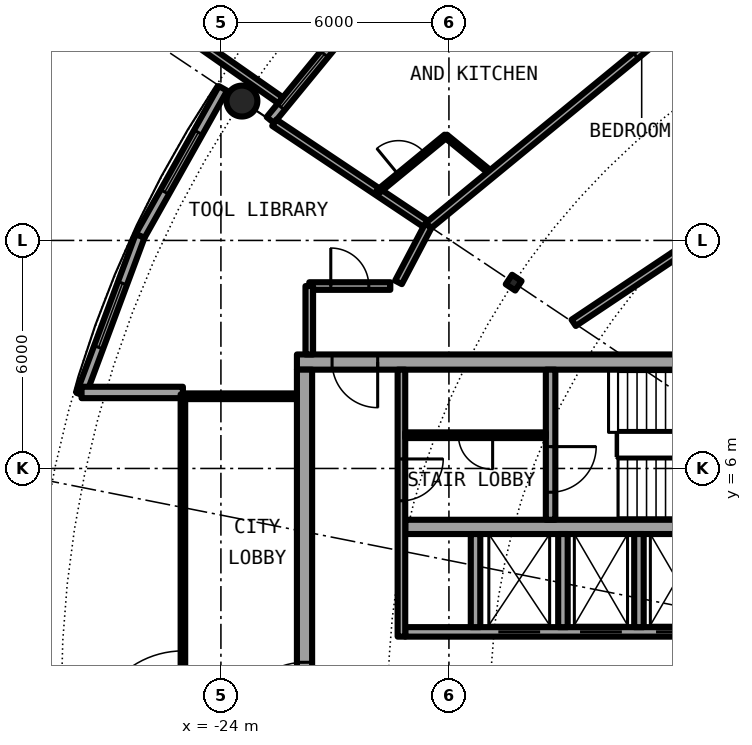
"""IFC4 building model, lengths in metres.
Left out: names, types, materials, properties, quantities, classifications, styles, units other than length and angle.
Written with IfcOpenShell. Run it as: python <this file> out.ifc"""

import sys

from ifc_helpers import new_model, si_unit, direction, frame, frame_2d, origin, origin_2d, place, context, subcontext, project, spatial, rectangle, hollow_circle, i_section, extrude, element, fill, save


model = new_model("IFC4")
c1 = context("Model", 3, precision=1e-05, world=origin(), true_north=direction((0.0, 1.0)))
c2 = subcontext(c1, "Body", "Model", "MODEL_VIEW")
j1 = project(units=[si_unit("LENGTHUNIT", "METRE"), si_unit("PLANEANGLEUNIT", "RADIAN")], contexts=[c1])
p1 = place(None, origin())
s1 = spatial("IfcSite", under=j1, at=p1, CompositionType="ELEMENT")
p2 = place(p1, origin())
s2 = spatial("IfcBuilding", under=s1, at=p2, CompositionType="ELEMENT")
p3 = place(p2, frame((0.0, 0.0, 227.95)))
s3 = spatial("IfcBuildingStorey", under=s2, at=p3, CompositionType="ELEMENT", Elevation=227.95)
p4 = place(p3, frame((-23.448, 15.667, 0.0), z_axis=(0.0, 0.0, 1.0), x_axis=(1.0, 0.0, 0.0)))
e1 = element("IfcColumn", 1, at=p4, inside=s3, PredefinedType="COLUMN", context=c2, shape_type="SweptSolid", body=[
    extrude(hollow_circle(Radius=0.406, WallThickness=0.03, at=origin_2d()), origin(), (0.0, 0.0, 1.0), 3.05),
])
p5 = place(p3, frame((-16.297, 10.889, 0.0), z_axis=(0.0, 0.0, 1.0), x_axis=(-0.831469612303, 0.55557023302, 0.0)))
e2 = element("IfcColumn", 2, at=p5, inside=s3, PredefinedType="COLUMN", context=c2, shape_type="SweptSolid", body=[
    extrude(i_section(OverallWidth=0.3, OverallDepth=0.3, WebThickness=0.011, FlangeThickness=0.019, FilletRadius=0.027, at=origin_2d()), origin(), (0.0, 0.0, 1.0), 3.05),
])
p6 = place(p3, frame((-19.304, 19.304, 0.0), z_axis=(0.0, 0.0, 1.0), x_axis=(-0.634382322723, -0.773019449054, 0.0)))
e3 = element("IfcWall", 3, at=p6, inside=s3, PredefinedType="SOLIDWALL", context=c2, shape_type="SweptSolid", body=[
    extrude(rectangle(XDim=5.352, YDim=0.25, at=frame_2d((2.676, 0.0))), origin(), (0.0, 0.0, 1.0), 2.7),
])
p7 = place(p6, frame((0.841, 0.0, 0.0)))
e4 = element("IfcOpeningElement", 4, at=p7, cuts=e3, PredefinedType="OPENING", context=c2, shape_type="SweptSolid", body=[
    extrude(rectangle(XDim=1.0, YDim=2.2, at=frame_2d((0.5, 1.1))), frame((0.0, 0.135, 0.0), z_axis=(0.0, -1.0, 0.0), x_axis=(1.0, 0.0, 0.0)), (0.0, 0.0, 1.0), 0.27),
])
p8 = place(p6, frame((3.111, 0.0, 0.3)))
e5 = element("IfcOpeningElement", 5, at=p8, cuts=e3, PredefinedType="OPENING", context=c2, shape_type="SweptSolid", body=[
    extrude(rectangle(XDim=1.8, YDim=2.1, at=frame_2d((0.9, 1.05))), frame((0.0, 0.135, 0.0), z_axis=(0.0, -1.0, 0.0), x_axis=(1.0, 0.0, 0.0)), (0.0, 0.0, 1.0), 0.27),
])
p9 = place(p3, frame((-22.433, 15.688, -0.03), z_axis=(0.0, 0.0, 1.0), x_axis=(-0.819373043115, 0.573260687834, 0.0)))
e6 = element("IfcWall", 6, at=p9, inside=s3, PredefinedType="SOLIDWALL", context=c2, shape_type="SweptSolid", body=[
    extrude(rectangle(XDim=2.925, YDim=0.2, at=frame_2d((1.463, 0.0))), origin(), (0.0, 0.0, 1.0), 2.73),
])
p10 = place(p3, frame((-23.946, 16.0, 0.0), z_axis=(0.0, 0.0, 1.0), x_axis=(-0.489696356642, -0.871893042919, 0.0)))
e7 = element("IfcWall", 7, at=p10, inside=s3, PredefinedType="SOLIDWALL", context=c2, shape_type="SweptSolid", body=[
    extrude(rectangle(XDim=4.454, YDim=0.25, at=frame_2d((2.227, 0.0))), origin(), (0.0, 0.0, 1.0), 2.7),
])
p11 = place(p10, frame((1.327, 0.0, 0.3)))
e8 = element("IfcOpeningElement", 8, at=p11, cuts=e7, PredefinedType="OPENING", context=c2, shape_type="SweptSolid", body=[
    extrude(rectangle(XDim=1.8, YDim=2.1, at=frame_2d((0.9, 1.05))), frame((0.0, 0.135, 0.0), z_axis=(0.0, -1.0, 0.0), x_axis=(1.0, 0.0, 0.0)), (0.0, 0.0, 1.0), 0.27),
])
p12 = place(p3, frame((-26.127, 12.117, 0.0), z_axis=(0.0, 0.0, 1.0), x_axis=(-0.349247811493, -0.937030397675, 0.0)))
e9 = element("IfcWall", 9, at=p12, inside=s3, PredefinedType="SOLIDWALL", context=c2, shape_type="SweptSolid", body=[
    extrude(rectangle(XDim=4.452, YDim=0.25, at=frame_2d((2.226, 0.0))), origin(), (0.0, 0.0, 1.0), 2.7),
])
p13 = place(p12, frame((1.327, 0.0, 0.3)))
e10 = element("IfcOpeningElement", 10, at=p13, cuts=e9, PredefinedType="OPENING", context=c2, shape_type="SweptSolid", body=[
    extrude(rectangle(XDim=1.8, YDim=2.1, at=frame_2d((0.9, 1.05))), frame((0.0, 0.135, 0.0), z_axis=(0.0, -1.0, 0.0), x_axis=(1.0, 0.0, 0.0)), (0.0, 0.0, 1.0), 0.27),
])
p14 = place(p3, frame((-25.0, 8.0, 0.0), z_axis=(0.0, 0.0, 1.0), x_axis=(-1.0, 0.0, 0.0)))
e11 = element("IfcWall", 11, at=p14, inside=s3, PredefinedType="SOLIDWALL", context=c2, shape_type="SweptSolid", body=[
    extrude(rectangle(XDim=2.667, YDim=0.3, at=frame_2d((1.333, 0.0))), origin(), (0.0, 0.0, 1.0), 2.7),
])
p15 = place(p3, frame((-8.6, 8.8, 0.0), z_axis=(0.0, 0.0, 1.0), x_axis=(-1.0, 0.0, 0.0)))
e12 = element("IfcWall", 12, at=p15, inside=s3, PredefinedType="SHEAR", context=c2, shape_type="SweptSolid", body=[
    extrude(rectangle(XDim=13.4, YDim=0.4, at=frame_2d((6.7, 0.0))), origin(), (0.0, 0.0, 1.0), 3.05),
])
p16 = place(p15, frame((11.275, 0.0, 0.0)))
e13 = element("IfcOpeningElement", 13, at=p16, cuts=e12, PredefinedType="OPENING", context=c2, shape_type="SweptSolid", body=[
    extrude(rectangle(XDim=1.2, YDim=2.3, at=frame_2d((0.6, 1.15))), frame((0.0, 0.21, 0.0), z_axis=(0.0, -1.0, 0.0), x_axis=(1.0, 0.0, 0.0)), (0.0, 0.0, 1.0), 0.42),
])
p17 = place(p3, frame((-21.8, -8.6, 0.0), z_axis=(0.0, 0.0, 1.0), x_axis=(0.0, 1.0, 0.0)))
e14 = element("IfcWall", 14, at=p17, inside=s3, PredefinedType="SHEAR", context=c2, shape_type="SweptSolid", body=[
    extrude(rectangle(XDim=17.2, YDim=0.4, at=frame_2d((8.6, 0.0))), origin(), (0.0, 0.0, 1.0), 3.05),
])
p18 = place(p17, frame((7.7, 0.0, 0.0)))
e15 = element("IfcOpeningElement", 15, at=p18, cuts=e14, PredefinedType="OPENING", context=c2, shape_type="SweptSolid", body=[
    extrude(rectangle(XDim=1.8, YDim=2.3, at=frame_2d((0.9, 1.15))), frame((0.0, 0.21, 0.0), z_axis=(0.0, -1.0, 0.0), x_axis=(1.0, 0.0, 0.0)), (0.0, 0.0, 1.0), 0.42),
])
p19 = place(p3, frame((-9.0, 1.7, 0.0), z_axis=(0.0, 0.0, 1.0), x_axis=(-1.0, 0.0, 0.0)))
e16 = element("IfcWall", 16, at=p19, inside=s3, PredefinedType="SHEAR", context=c2, shape_type="SweptSolid", body=[
    extrude(rectangle(XDim=10.15, YDim=0.25, at=frame_2d((5.075, 0.0))), origin(), (0.0, 0.0, 1.0), 3.05),
])
p20 = place(p19, frame((0.387, 0.0, 0.0)))
e17 = element("IfcOpeningElement", 17, at=p20, cuts=e16, PredefinedType="OPENING", context=c2, shape_type="SweptSolid", body=[
    extrude(rectangle(XDim=1.1, YDim=2.3, at=frame_2d((0.55, 1.15))), frame((0.0, 0.135, 0.0), z_axis=(0.0, -1.0, 0.0), x_axis=(1.0, 0.0, 0.0)), (0.0, 0.0, 1.0), 0.27),
])
p21 = place(p19, frame((2.45, 0.0, 0.0)))
e18 = element("IfcOpeningElement", 18, at=p21, cuts=e16, PredefinedType="OPENING", context=c2, shape_type="SweptSolid", body=[
    extrude(rectangle(XDim=1.1, YDim=2.3, at=frame_2d((0.55, 1.15))), frame((0.0, 0.135, 0.0), z_axis=(0.0, -1.0, 0.0), x_axis=(1.0, 0.0, 0.0)), (0.0, 0.0, 1.0), 0.27),
])
p22 = place(p19, frame((4.45, 0.0, 0.0)))
e19 = element("IfcOpeningElement", 19, at=p22, cuts=e16, PredefinedType="OPENING", context=c2, shape_type="SweptSolid", body=[
    extrude(rectangle(XDim=1.1, YDim=2.3, at=frame_2d((0.55, 1.15))), frame((0.0, 0.135, 0.0), z_axis=(0.0, -1.0, 0.0), x_axis=(1.0, 0.0, 0.0)), (0.0, 0.0, 1.0), 0.27),
])
p23 = place(p19, frame((6.6, 0.0, 0.0)))
e20 = element("IfcOpeningElement", 20, at=p23, cuts=e16, PredefinedType="OPENING", context=c2, shape_type="SweptSolid", body=[
    extrude(rectangle(XDim=1.1, YDim=2.3, at=frame_2d((0.55, 1.15))), frame((0.0, 0.135, 0.0), z_axis=(0.0, -1.0, 0.0), x_axis=(1.0, 0.0, 0.0)), (0.0, 0.0, 1.0), 0.27),
])
p24 = place(p3, frame((-9.0, 4.462, 0.0), z_axis=(0.0, 0.0, 1.0), x_axis=(-1.0, 0.0, 0.0)))
e21 = element("IfcWall", 21, at=p24, inside=s3, PredefinedType="SHEAR", context=c2, shape_type="SweptSolid", body=[
    extrude(rectangle(XDim=10.15, YDim=0.375, at=frame_2d((5.075, 0.0))), origin(), (0.0, 0.0, 1.0), 3.05),
])
p25 = place(p3, frame((-15.325, 8.6, 0.0), z_axis=(0.0, 0.0, 1.0), x_axis=(0.0, -1.0, 0.0)))
e22 = element("IfcWall", 22, at=p25, inside=s3, PredefinedType="SHEAR", context=c2, shape_type="SweptSolid", body=[
    extrude(rectangle(XDim=3.95, YDim=0.25, at=frame_2d((1.975, 0.0))), origin(), (0.0, 0.0, 1.0), 3.05),
])
p26 = place(p25, frame((2.025, 0.0, 0.0)))
e23 = element("IfcOpeningElement", 23, at=p26, cuts=e22, PredefinedType="OPENING", context=c2, shape_type="SweptSolid", body=[
    extrude(rectangle(XDim=1.2, YDim=2.3, at=frame_2d((0.6, 1.15))), frame((0.0, 0.135, 0.0), z_axis=(0.0, -1.0, 0.0), x_axis=(1.0, 0.0, 0.0)), (0.0, 0.0, 1.0), 0.27),
])
for number, where, z_axis, x_axis in (
    (24, (-15.0, 1.825, 0.0), (0.0, 0.0, 1.0), (0.0, 1.0, 0.0)),
    (25, (-17.3, 1.825, 0.0), (0.0, 0.0, 1.0), (0.0, 1.0, 0.0)),
):
    element("IfcWall", number, at=place(p3, frame(where, z_axis=z_axis, x_axis=x_axis)), inside=s3, PredefinedType="SOLIDWALL", context=c2, shape_type="SweptSolid", body=[
        extrude(rectangle(XDim=2.45, YDim=0.25, at=frame_2d((1.225, 0.0))), origin(), (0.0, 0.0, 1.0), 2.7),
    ])
p27 = place(p3, frame((-19.25, 8.6, 0.0), z_axis=(0.0, 0.0, 1.0), x_axis=(0.0, -1.0, 0.0)))
e26 = element("IfcWall", 26, at=p27, inside=s3, PredefinedType="SOLIDWALL", context=c2, shape_type="SweptSolid", body=[
    extrude(rectangle(XDim=7.025, YDim=0.2, at=frame_2d((3.513, 0.0))), origin(), (0.0, 0.0, 1.0), 2.7),
])
p28 = place(p27, frame((2.35, 0.0, 0.0)))
e27 = element("IfcOpeningElement", 27, at=p28, cuts=e26, PredefinedType="OPENING", context=c2, shape_type="SweptSolid", body=[
    extrude(rectangle(XDim=1.1, YDim=2.3, at=frame_2d((0.55, 1.15))), frame((0.0, 0.11, 0.0), z_axis=(0.0, -1.0, 0.0), x_axis=(1.0, 0.0, 0.0)), (0.0, 0.0, 1.0), 0.22),
])
p29 = place(p3, frame((-13.0, 1.825, 0.0), z_axis=(0.0, 0.0, 1.0), x_axis=(0.0, 1.0, 0.0)))
e28 = element("IfcWall", 28, at=p29, inside=s3, PredefinedType="SOLIDWALL", context=c2, shape_type="SweptSolid", body=[
    extrude(rectangle(XDim=2.45, YDim=0.25, at=frame_2d((1.225, 0.0))), origin(), (0.0, 0.0, 1.0), 2.7),
])
p30 = place(p3, frame((-15.45, 6.875, 0.0), z_axis=(0.0, 0.0, 1.0), x_axis=(-1.0, 0.0, 0.0)))
e29 = element("IfcWall", 29, at=p30, inside=s3, PredefinedType="PARTITIONING", context=c2, shape_type="SweptSolid", body=[
    extrude(rectangle(XDim=3.7, YDim=0.15, at=frame_2d((1.85, 0.0))), origin(), (0.0, 0.0, 1.0), 2.7),
])
p31 = place(p30, frame((1.4, 0.0, 0.0)))
e30 = element("IfcOpeningElement", 30, at=p31, cuts=e29, PredefinedType="OPENING", context=c2, shape_type="SweptSolid", body=[
    extrude(rectangle(XDim=0.9, YDim=2.3, at=frame_2d((0.45, 1.15))), frame((0.0, 0.085, 0.0), z_axis=(0.0, -1.0, 0.0), x_axis=(1.0, 0.0, 0.0)), (0.0, 0.0, 1.0), 0.17),
])
p32 = place(p3, frame((-22.0, 7.9, 0.0), z_axis=(0.0, 0.0, 1.0), x_axis=(-1.0, 0.0, 0.0)))
e31 = element("IfcWall", 31, at=p32, inside=s3, PredefinedType="PARTITIONING", context=c2, shape_type="SweptSolid", body=[
    extrude(rectangle(XDim=2.94, YDim=0.15, at=frame_2d((1.47, 0.0))), origin(), (0.0, 0.0, 1.0), 2.7),
])
p33 = place(p3, frame((-25.0, -7.95, 0.0), z_axis=(0.0, 0.0, 1.0), x_axis=(0.0, 1.0, 0.0)))
e32 = element("IfcWall", 32, at=p33, inside=s3, PredefinedType="PARTITIONING", context=c2, shape_type="SweptSolid", body=[
    extrude(rectangle(XDim=15.9, YDim=0.12, at=frame_2d((7.95, 0.0))), origin(), (0.0, 0.0, 1.0), 2.7),
])
p34 = place(p33, frame((6.75, 0.0, 0.0)))
e33 = element("IfcOpeningElement", 33, at=p34, cuts=e32, PredefinedType="OPENING", context=c2, shape_type="SweptSolid", body=[
    extrude(rectangle(XDim=2.4, YDim=2.3, at=frame_2d((1.2, 1.15))), frame((0.0, 0.07, 0.0), z_axis=(0.0, -1.0, 0.0), x_axis=(1.0, 0.0, 0.0)), (0.0, 0.0, 1.0), 0.14),
])
p35 = place(p33, frame((11.55, 0.0, 0.1)))
e34 = element("IfcOpeningElement", 34, at=p35, cuts=e32, PredefinedType="OPENING", context=c2, shape_type="SweptSolid", body=[
    extrude(rectangle(XDim=3.4, YDim=2.35, at=frame_2d((1.7, 1.175))), frame((0.0, 0.07, 0.0), z_axis=(0.0, -1.0, 0.0), x_axis=(1.0, 0.0, 0.0)), (0.0, 0.0, 1.0), 0.14),
])
p36 = place(p33, frame((0.95, 0.0, 0.1)))
e35 = element("IfcOpeningElement", 35, at=p36, cuts=e32, PredefinedType="OPENING", context=c2, shape_type="SweptSolid", body=[
    extrude(rectangle(XDim=3.4, YDim=2.35, at=frame_2d((1.7, 1.175))), frame((0.0, 0.07, 0.0), z_axis=(0.0, -1.0, 0.0), x_axis=(1.0, 0.0, 0.0)), (0.0, 0.0, 1.0), 0.14),
])
p37 = place(p3, frame((-22.595, 15.098, 0.0), z_axis=(0.0, 0.0, 1.0), x_axis=(0.831387096605, -0.55569370664, 0.0)))
e36 = element("IfcWall", 36, at=p37, inside=s3, PredefinedType="PARTITIONING", context=c2, shape_type="SweptSolid", body=[
    extrude(rectangle(XDim=4.875, YDim=0.2, at=frame_2d((2.438, 0.0))), origin(), (0.0, 0.0, 1.0), 2.7),
])
p38 = place(p3, frame((-18.084, 14.745, 0.0), z_axis=(0.0, 0.0, 1.0), x_axis=(0.774869051393, -0.632121786679, 0.0)))
e37 = element("IfcWall", 37, at=p38, inside=s3, PredefinedType="PARTITIONING", context=c2, shape_type="SweptSolid", body=[
    extrude(rectangle(XDim=1.562, YDim=0.1, at=frame_2d((0.781, 0.0))), origin(), (0.0, 0.0, 1.0), 2.7),
])
p39 = place(p3, frame((-21.675, 10.8, 0.0), z_axis=(0.0, 0.0, 1.0), x_axis=(1.0, 0.0, 0.0)))
e38 = element("IfcWall", 38, at=p39, inside=s3, PredefinedType="PARTITIONING", context=c2, shape_type="SweptSolid", body=[
    extrude(rectangle(XDim=2.132, YDim=0.2, at=frame_2d((1.066, 0.0))), origin(), (0.0, 0.0, 1.0), 2.7),
])
p40 = place(p39, frame((0.566, 0.0, 0.0)))
e39 = element("IfcOpeningElement", 39, at=p40, cuts=e38, PredefinedType="OPENING", context=c2, shape_type="SweptSolid", body=[
    extrude(rectangle(XDim=1.0, YDim=2.3, at=frame_2d((0.5, 1.15))), frame((0.0, 0.11, 0.0), z_axis=(0.0, -1.0, 0.0), x_axis=(1.0, 0.0, 0.0)), (0.0, 0.0, 1.0), 0.22),
])
p41 = place(p3, frame((-14.718, 9.832, 0.0), z_axis=(0.0, 0.0, 1.0), x_axis=(0.831437137577, 0.555618831806, 0.0)))
e40 = element("IfcWall", 40, at=p41, inside=s3, PredefinedType="PARTITIONING", context=c2, shape_type="SweptSolid", body=[
    extrude(rectangle(XDim=13.549, YDim=0.2, at=frame_2d((6.774, 0.0))), origin(), (0.0, 0.0, 1.0), 2.7),
])
p42 = place(p41, frame((7.968, 0.0, 0.0)))
e41 = element("IfcOpeningElement", 41, at=p42, cuts=e40, PredefinedType="OPENING", context=c2, shape_type="SweptSolid", body=[
    extrude(rectangle(XDim=1.0, YDim=2.3, at=frame_2d((0.5, 1.15))), frame((0.0, 0.11, 0.0), z_axis=(0.0, -1.0, 0.0), x_axis=(1.0, 0.0, 0.0)), (0.0, 0.0, 1.0), 0.22),
])
p43 = place(p3, frame((-18.542, 12.389, 0.0), z_axis=(0.0, 0.0, 1.0), x_axis=(0.772983503654, 0.634426121056, 0.0)))
e42 = element("IfcWall", 42, at=p43, inside=s3, PredefinedType="PARTITIONING", context=c2, shape_type="SweptSolid", body=[
    extrude(rectangle(XDim=12.947, YDim=0.2, at=frame_2d((6.474, 0.0))), origin(), (0.0, 0.0, 1.0), 2.7),
])
p44 = place(p43, frame((7.053, 0.0, 0.0)))
e43 = element("IfcOpeningElement", 43, at=p44, cuts=e42, PredefinedType="OPENING", context=c2, shape_type="SweptSolid", body=[
    extrude(rectangle(XDim=1.0, YDim=2.3, at=frame_2d((0.5, 1.15))), frame((0.0, 0.11, 0.0), z_axis=(0.0, -1.0, 0.0), x_axis=(1.0, 0.0, 0.0)), (0.0, 0.0, 1.0), 0.22),
])
p45 = place(p3, frame((-21.675, 9.0, 0.0), z_axis=(0.0, 0.0, 1.0), x_axis=(0.0, 1.0, 0.0)))
e44 = element("IfcWall", 44, at=p45, inside=s3, PredefinedType="PARTITIONING", context=c2, shape_type="SweptSolid", body=[
    extrude(rectangle(XDim=1.8, YDim=0.2, at=frame_2d((0.9, 0.0))), origin(), (0.0, 0.0, 1.0), 2.7),
])
p46 = place(p3, frame((-19.328, 10.896, 0.0), z_axis=(0.0, 0.0, 1.0), x_axis=(0.465812036273, 0.88488369115, 0.0)))
e45 = element("IfcWall", 45, at=p46, inside=s3, PredefinedType="PARTITIONING", context=c2, shape_type="SweptSolid", body=[
    extrude(rectangle(XDim=1.687, YDim=0.2, at=frame_2d((0.844, 0.0))), origin(), (0.0, 0.0, 1.0), 2.7),
])
p47 = place(p3, frame((-19.872, 13.278, 0.0), z_axis=(0.0, 0.0, 1.0), x_axis=(0.773095932958, 0.634289112663, 0.0)))
e46 = element("IfcWall", 46, at=p47, inside=s3, PredefinedType="PARTITIONING", context=c2, shape_type="SweptSolid", body=[
    extrude(rectangle(XDim=2.313, YDim=0.1, at=frame_2d((1.156, 0.0))), origin(), (0.0, 0.0, 1.0), 2.7),
])
p48 = place(p47, frame((0.706, 0.0, 0.0)))
e47 = element("IfcOpeningElement", 47, at=p48, cuts=e46, PredefinedType="OPENING", context=c2, shape_type="SweptSolid", body=[
    extrude(rectangle(XDim=0.9, YDim=2.3, at=frame_2d((0.45, 1.15))), frame((0.0, 0.06, 0.0), z_axis=(0.0, -1.0, 0.0), x_axis=(1.0, 0.0, 0.0)), (0.0, 0.0, 1.0), 0.12),
])
p49 = place(p8, origin())
e48 = element("IfcWindow", 48, at=p49, inside=s3, PartitioningType="SINGLE_PANEL", PredefinedType="WINDOW", context=c2, shape_type="SweptSolid", body=[
    extrude(rectangle(XDim=1.8, YDim=2.1, at=frame_2d((0.9, 1.05))), frame((0.0, 0.03, 0.0), z_axis=(0.0, -1.0, 0.0), x_axis=(1.0, 0.0, 0.0)), (0.0, 0.0, 1.0), 0.06),
])
fill(e5, e48)
p50 = place(p11, origin())
e49 = element("IfcWindow", 49, at=p50, inside=s3, PartitioningType="SINGLE_PANEL", PredefinedType="WINDOW", context=c2, shape_type="SweptSolid", body=[
    extrude(rectangle(XDim=1.8, YDim=2.1, at=frame_2d((0.9, 1.05))), frame((0.0, 0.03, 0.0), z_axis=(0.0, -1.0, 0.0), x_axis=(1.0, 0.0, 0.0)), (0.0, 0.0, 1.0), 0.06),
])
fill(e8, e49)
p51 = place(p13, origin())
e50 = element("IfcWindow", 50, at=p51, inside=s3, PartitioningType="SINGLE_PANEL", PredefinedType="WINDOW", context=c2, shape_type="SweptSolid", body=[
    extrude(rectangle(XDim=1.8, YDim=2.1, at=frame_2d((0.9, 1.05))), frame((0.0, 0.03, 0.0), z_axis=(0.0, -1.0, 0.0), x_axis=(1.0, 0.0, 0.0)), (0.0, 0.0, 1.0), 0.06),
])
fill(e10, e50)
p52 = place(p21, origin())
e51 = element("IfcDoor", 51, at=p52, inside=s3, OperationType="DOUBLE_DOOR_SLIDING", PredefinedType="DOOR", context=c2, shape_type="SweptSolid", body=[
    extrude(rectangle(XDim=1.1, YDim=2.3, at=frame_2d((0.55, 1.15))), frame((0.0, 0.025, 0.0), z_axis=(0.0, -1.0, 0.0), x_axis=(1.0, 0.0, 0.0)), (0.0, 0.0, 1.0), 0.05),
])
fill(e18, e51)
p53 = place(p22, origin())
e52 = element("IfcDoor", 52, at=p53, inside=s3, OperationType="DOUBLE_DOOR_SLIDING", PredefinedType="DOOR", context=c2, shape_type="SweptSolid", body=[
    extrude(rectangle(XDim=1.1, YDim=2.3, at=frame_2d((0.55, 1.15))), frame((0.0, 0.025, 0.0), z_axis=(0.0, -1.0, 0.0), x_axis=(1.0, 0.0, 0.0)), (0.0, 0.0, 1.0), 0.05),
])
fill(e19, e52)
p54 = place(p23, origin())
e53 = element("IfcDoor", 53, at=p54, inside=s3, OperationType="DOUBLE_DOOR_SLIDING", PredefinedType="DOOR", context=c2, shape_type="SweptSolid", body=[
    extrude(rectangle(XDim=1.1, YDim=2.3, at=frame_2d((0.55, 1.15))), frame((0.0, 0.025, 0.0), z_axis=(0.0, -1.0, 0.0), x_axis=(1.0, 0.0, 0.0)), (0.0, 0.0, 1.0), 0.05),
])
fill(e20, e53)
p55 = place(p31, origin())
e54 = element("IfcDoor", 54, at=p55, inside=s3, OperationType="SINGLE_SWING_LEFT", PredefinedType="DOOR", context=c2, shape_type="SweptSolid", body=[
    extrude(rectangle(XDim=0.9, YDim=2.3, at=frame_2d((0.45, 1.15))), frame((0.0, 0.025, 0.0), z_axis=(0.0, -1.0, 0.0), x_axis=(1.0, 0.0, 0.0)), (0.0, 0.0, 1.0), 0.05),
])
fill(e30, e54)
p56 = place(p26, origin())
e55 = element("IfcDoor", 55, at=p56, inside=s3, OperationType="SINGLE_SWING_LEFT", PredefinedType="DOOR", context=c2, shape_type="SweptSolid", body=[
    extrude(rectangle(XDim=1.2, YDim=2.3, at=frame_2d((0.6, 1.15))), frame((0.0, 0.025, 0.0), z_axis=(0.0, -1.0, 0.0), x_axis=(1.0, 0.0, 0.0)), (0.0, 0.0, 1.0), 0.05),
])
fill(e23, e55)
p57 = place(p28, origin())
e56 = element("IfcDoor", 56, at=p57, inside=s3, OperationType="SINGLE_SWING_RIGHT", PredefinedType="DOOR", context=c2, shape_type="SweptSolid", body=[
    extrude(rectangle(XDim=1.1, YDim=2.3, at=frame_2d((0.55, 1.15))), frame((0.0, 0.025, 0.0), z_axis=(0.0, -1.0, 0.0), x_axis=(1.0, 0.0, 0.0)), (0.0, 0.0, 1.0), 0.05),
])
fill(e27, e56)
p58 = place(p16, origin())
e57 = element("IfcDoor", 57, at=p58, inside=s3, OperationType="SINGLE_SWING_LEFT", PredefinedType="DOOR", context=c2, shape_type="SweptSolid", body=[
    extrude(rectangle(XDim=1.2, YDim=2.3, at=frame_2d((0.6, 1.15))), frame((0.0, 0.025, 0.0), z_axis=(0.0, -1.0, 0.0), x_axis=(1.0, 0.0, 0.0)), (0.0, 0.0, 1.0), 0.05),
])
fill(e13, e57)
p59 = place(p18, origin())
e58 = element("IfcDoor", 58, at=p59, inside=s3, OperationType="SINGLE_SWING_LEFT", PredefinedType="DOOR", context=c2, shape_type="SweptSolid", body=[
    extrude(rectangle(XDim=1.8, YDim=2.3, at=frame_2d((0.9, 1.15))), frame((0.0, 0.025, 0.0), z_axis=(0.0, -1.0, 0.0), x_axis=(1.0, 0.0, 0.0)), (0.0, 0.0, 1.0), 0.05),
])
fill(e15, e58)
p60 = place(p34, origin())
e59 = element("IfcDoor", 59, at=p60, inside=s3, OperationType="SINGLE_SWING_LEFT", PredefinedType="DOOR", context=c2, shape_type="SweptSolid", body=[
    extrude(rectangle(XDim=2.4, YDim=2.3, at=frame_2d((1.2, 1.15))), frame((0.0, 0.025, 0.0), z_axis=(0.0, -1.0, 0.0), x_axis=(1.0, 0.0, 0.0)), (0.0, 0.0, 1.0), 0.05),
])
fill(e33, e59)
p61 = place(p35, origin())
e60 = element("IfcWindow", 60, at=p61, inside=s3, PartitioningType="SINGLE_PANEL", PredefinedType="WINDOW", context=c2, shape_type="SweptSolid", body=[
    extrude(rectangle(XDim=3.4, YDim=2.35, at=frame_2d((1.7, 1.175))), frame((0.0, 0.03, 0.0), z_axis=(0.0, -1.0, 0.0), x_axis=(1.0, 0.0, 0.0)), (0.0, 0.0, 1.0), 0.06),
])
fill(e34, e60)
p62 = place(p44, origin())
e61 = element("IfcDoor", 61, at=p62, inside=s3, OperationType="SINGLE_SWING_RIGHT", PredefinedType="DOOR", context=c2, shape_type="SweptSolid", body=[
    extrude(rectangle(XDim=1.0, YDim=2.3, at=frame_2d((0.5, 1.15))), frame((0.0, 0.025, 0.0), z_axis=(0.0, -1.0, 0.0), x_axis=(1.0, 0.0, 0.0)), (0.0, 0.0, 1.0), 0.05),
])
fill(e43, e61)
p63 = place(p48, origin())
e62 = element("IfcDoor", 62, at=p63, inside=s3, OperationType="SINGLE_SWING_LEFT", PredefinedType="DOOR", context=c2, shape_type="SweptSolid", body=[
    extrude(rectangle(XDim=0.9, YDim=2.3, at=frame_2d((0.45, 1.15))), frame((0.0, 0.025, 0.0), z_axis=(0.0, -1.0, 0.0), x_axis=(1.0, 0.0, 0.0)), (0.0, 0.0, 1.0), 0.05),
])
fill(e47, e62)
p64 = place(p40, origin())
e63 = element("IfcDoor", 63, at=p64, inside=s3, OperationType="SINGLE_SWING_LEFT", PredefinedType="DOOR", context=c2, shape_type="SweptSolid", body=[
    extrude(rectangle(XDim=1.0, YDim=2.3, at=frame_2d((0.5, 1.15))), frame((0.0, 0.025, 0.0), z_axis=(0.0, -1.0, 0.0), x_axis=(1.0, 0.0, 0.0)), (0.0, 0.0, 1.0), 0.05),
])
fill(e39, e63)
save(model, sys.argv[1])
